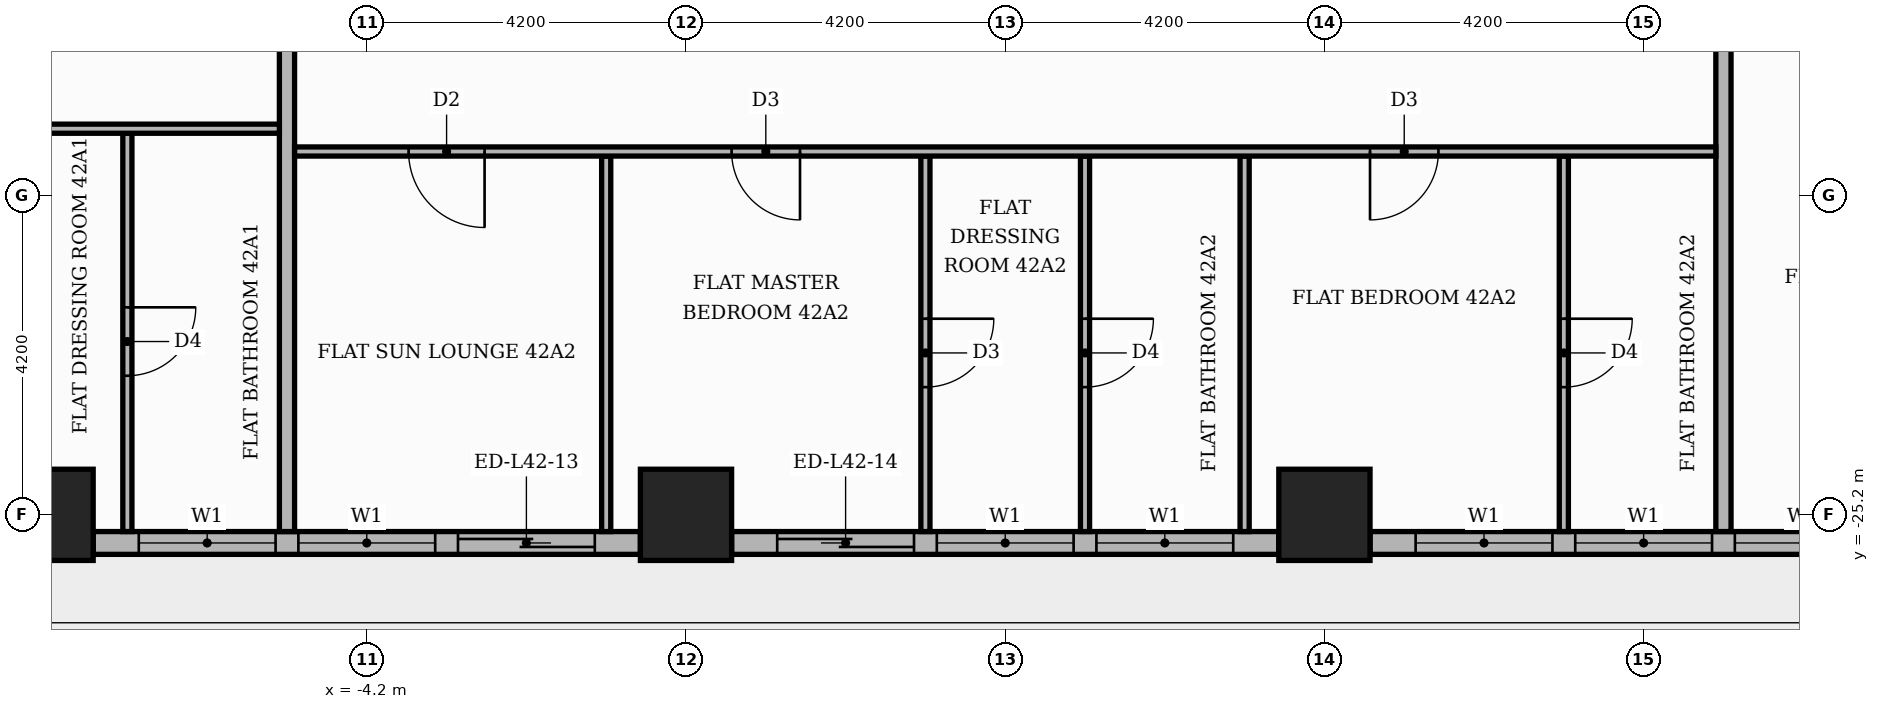
"""IFC4 building model, lengths in metres.
Left out: names, types, materials, properties, quantities, classifications, styles, units other than length and angle.
Written with IfcOpenShell. Run it as: python <this file> out.ifc"""

import sys

from ifc_helpers import new_model, si_unit, direction, frame, frame_2d, origin, origin_2d, place, context, subcontext, project, spatial, rectangle, extrude, element, fill, save


model = new_model("IFC4")
c1 = context("Model", 3, precision=1e-05, world=origin(), true_north=direction((0.0, 1.0)))
c2 = subcontext(c1, "Body", "Model", "MODEL_VIEW")
j1 = project(units=[si_unit("LENGTHUNIT", "METRE"), si_unit("PLANEANGLEUNIT", "RADIAN")], contexts=[c1])
p1 = place(None, origin())
s1 = spatial("IfcSite", under=j1, at=p1, CompositionType="ELEMENT")
p2 = place(p1, origin())
s2 = spatial("IfcBuilding", under=s1, at=p2, CompositionType="ELEMENT")
p3 = place(p2, frame((0.0, 0.0, 176.7)))
s3 = spatial("IfcBuildingStorey", under=s2, at=p3, CompositionType="ELEMENT", Elevation=176.7)
for number, where, z_axis, x_axis in (
    (1, (0.0, -25.2, 0.0), (0.0, 0.0, 1.0), (1.0, 0.0, 0.0)),
    (2, (8.4, -25.2, 0.0), (0.0, 0.0, 1.0), (1.0, 0.0, 0.0)),
    (3, (-8.4, -25.2, 0.0), (0.0, 0.0, 1.0), (1.0, 0.0, 0.0)),
):
    element("IfcColumn", number, at=place(p3, frame(where, z_axis=z_axis, x_axis=x_axis)), inside=s3, PredefinedType="COLUMN", context=c2, shape_type="SweptSolid", body=[
        extrude(rectangle(XDim=1.2, YDim=1.2, at=origin_2d()), origin(), (0.0, 0.0, 1.0), 3.9),
    ])
p4 = place(p3, frame((-7.8, -25.57, 0.0), z_axis=(0.0, 0.0, 1.0), x_axis=(1.0, 0.0, 0.0)))
e4 = element("IfcWall", 4, at=p4, inside=s3, PredefinedType="STANDARD", context=c2, shape_type="SweptSolid", body=[
    extrude(rectangle(XDim=7.2, YDim=0.3, at=frame_2d((3.6, 0.0))), origin(), (0.0, 0.0, 1.0), 3.4),
])
p5 = place(p4, frame((0.6, 0.0, 0.9)))
e5 = element("IfcOpeningElement", 5, at=p5, cuts=e4, PredefinedType="OPENING", context=c2, shape_type="SweptSolid", body=[
    extrude(rectangle(XDim=1.8, YDim=2.1, at=frame_2d((0.9, 1.05))), frame((0.0, 0.16, 0.0), z_axis=(0.0, -1.0, 0.0), x_axis=(1.0, 0.0, 0.0)), (0.0, 0.0, 1.0), 0.32),
])
p6 = place(p4, frame((2.7, 0.0, 0.9)))
e6 = element("IfcOpeningElement", 6, at=p6, cuts=e4, PredefinedType="OPENING", context=c2, shape_type="SweptSolid", body=[
    extrude(rectangle(XDim=1.8, YDim=2.1, at=frame_2d((0.9, 1.05))), frame((0.0, 0.16, 0.0), z_axis=(0.0, -1.0, 0.0), x_axis=(1.0, 0.0, 0.0)), (0.0, 0.0, 1.0), 0.32),
])
p7 = place(p4, frame((4.8, 0.0, 0.0)))
e7 = element("IfcOpeningElement", 7, at=p7, cuts=e4, PredefinedType="OPENING", context=c2, shape_type="SweptSolid", body=[
    extrude(rectangle(XDim=1.8, YDim=2.4, at=frame_2d((0.9, 1.2))), frame((0.0, 0.16, 0.0), z_axis=(0.0, -1.0, 0.0), x_axis=(1.0, 0.0, 0.0)), (0.0, 0.0, 1.0), 0.32),
])
p8 = place(p3, frame((0.6, -25.57, 0.0), z_axis=(0.0, 0.0, 1.0), x_axis=(1.0, 0.0, 0.0)))
e8 = element("IfcWall", 8, at=p8, inside=s3, PredefinedType="STANDARD", context=c2, shape_type="SweptSolid", body=[
    extrude(rectangle(XDim=7.2, YDim=0.3, at=frame_2d((3.6, 0.0))), origin(), (0.0, 0.0, 1.0), 3.4),
])
p9 = place(p8, frame((0.6, 0.0, 0.0)))
e9 = element("IfcOpeningElement", 9, at=p9, cuts=e8, PredefinedType="OPENING", context=c2, shape_type="SweptSolid", body=[
    extrude(rectangle(XDim=1.8, YDim=2.4, at=frame_2d((0.9, 1.2))), frame((0.0, 0.16, 0.0), z_axis=(0.0, -1.0, 0.0), x_axis=(1.0, 0.0, 0.0)), (0.0, 0.0, 1.0), 0.32),
])
p10 = place(p8, frame((2.7, 0.0, 0.9)))
e10 = element("IfcOpeningElement", 10, at=p10, cuts=e8, PredefinedType="OPENING", context=c2, shape_type="SweptSolid", body=[
    extrude(rectangle(XDim=1.8, YDim=2.1, at=frame_2d((0.9, 1.05))), frame((0.0, 0.16, 0.0), z_axis=(0.0, -1.0, 0.0), x_axis=(1.0, 0.0, 0.0)), (0.0, 0.0, 1.0), 0.32),
])
p11 = place(p8, frame((4.8, 0.0, 0.9)))
e11 = element("IfcOpeningElement", 11, at=p11, cuts=e8, PredefinedType="OPENING", context=c2, shape_type="SweptSolid", body=[
    extrude(rectangle(XDim=1.8, YDim=2.1, at=frame_2d((0.9, 1.05))), frame((0.0, 0.16, 0.0), z_axis=(0.0, -1.0, 0.0), x_axis=(1.0, 0.0, 0.0)), (0.0, 0.0, 1.0), 0.32),
])
p12 = place(p3, frame((9.0, -25.57, 0.0), z_axis=(0.0, 0.0, 1.0), x_axis=(1.0, 0.0, 0.0)))
e12 = element("IfcWall", 12, at=p12, inside=s3, PredefinedType="STANDARD", context=c2, shape_type="SweptSolid", body=[
    extrude(rectangle(XDim=7.2, YDim=0.3, at=frame_2d((3.6, 0.0))), origin(), (0.0, 0.0, 1.0), 3.4),
])
p13 = place(p12, frame((0.6, 0.0, 0.9)))
e13 = element("IfcOpeningElement", 13, at=p13, cuts=e12, PredefinedType="OPENING", context=c2, shape_type="SweptSolid", body=[
    extrude(rectangle(XDim=1.8, YDim=2.1, at=frame_2d((0.9, 1.05))), frame((0.0, 0.16, 0.0), z_axis=(0.0, -1.0, 0.0), x_axis=(1.0, 0.0, 0.0)), (0.0, 0.0, 1.0), 0.32),
])
p14 = place(p12, frame((2.7, 0.0, 0.9)))
e14 = element("IfcOpeningElement", 14, at=p14, cuts=e12, PredefinedType="OPENING", context=c2, shape_type="SweptSolid", body=[
    extrude(rectangle(XDim=1.8, YDim=2.1, at=frame_2d((0.9, 1.05))), frame((0.0, 0.16, 0.0), z_axis=(0.0, -1.0, 0.0), x_axis=(1.0, 0.0, 0.0)), (0.0, 0.0, 1.0), 0.32),
])
p15 = place(p12, frame((4.8, 0.0, 0.9)))
e15 = element("IfcOpeningElement", 15, at=p15, cuts=e12, PredefinedType="OPENING", context=c2, shape_type="SweptSolid", body=[
    extrude(rectangle(XDim=1.8, YDim=2.1, at=frame_2d((0.9, 1.05))), frame((0.0, 0.16, 0.0), z_axis=(0.0, -1.0, 0.0), x_axis=(1.0, 0.0, 0.0)), (0.0, 0.0, 1.0), 0.32),
])
p16 = place(p3, frame((-7.35, -25.42, 0.0), z_axis=(0.0, 0.0, 1.0), x_axis=(0.0, 1.0, 0.0)))
e16 = element("IfcWall", 16, at=p16, inside=s3, PredefinedType="PARTITIONING", context=c2, shape_type="SweptSolid", body=[
    extrude(rectangle(XDim=5.24, YDim=0.12, at=frame_2d((2.62, 0.0))), origin(), (0.0, 0.0, 1.0), 3.4),
])
p17 = place(p16, frame((2.05, 0.0, 0.0)))
e17 = element("IfcOpeningElement", 17, at=p17, cuts=e16, PredefinedType="OPENING", context=c2, shape_type="SweptSolid", body=[
    extrude(rectangle(XDim=0.9, YDim=2.1, at=frame_2d((0.45, 1.05))), frame((0.0, 0.07, 0.0), z_axis=(0.0, -1.0, 0.0), x_axis=(1.0, 0.0, 0.0)), (0.0, 0.0, 1.0), 0.14),
])
p18 = place(p3, frame((-5.25, -25.42, 0.0), z_axis=(0.0, 0.0, 1.0), x_axis=(0.0, 1.0, 0.0)))
e18 = element("IfcWall", 18, at=p18, inside=s3, PredefinedType="PARTITIONING", context=c2, shape_type="SweptSolid", body=[
    extrude(rectangle(XDim=11.67, YDim=0.2, at=frame_2d((5.835, 0.0))), origin(), (0.0, 0.0, 1.0), 3.4),
])
p19 = place(p3, frame((-1.05, -25.42, 0.0), z_axis=(0.0, 0.0, 1.0), x_axis=(0.0, 1.0, 0.0)))
e19 = element("IfcWall", 19, at=p19, inside=s3, PredefinedType="PARTITIONING", context=c2, shape_type="SweptSolid", body=[
    extrude(rectangle(XDim=4.94, YDim=0.12, at=frame_2d((2.47, 0.0))), origin(), (0.0, 0.0, 1.0), 3.4),
])
p20 = place(p3, frame((3.15, -25.42, 0.0), z_axis=(0.0, 0.0, 1.0), x_axis=(0.0, 1.0, 0.0)))
e20 = element("IfcWall", 20, at=p20, inside=s3, PredefinedType="PARTITIONING", context=c2, shape_type="SweptSolid", body=[
    extrude(rectangle(XDim=4.94, YDim=0.12, at=frame_2d((2.47, 0.0))), origin(), (0.0, 0.0, 1.0), 3.4),
])
p21 = place(p20, frame((1.9, 0.0, 0.0)))
e21 = element("IfcOpeningElement", 21, at=p21, cuts=e20, PredefinedType="OPENING", context=c2, shape_type="SweptSolid", body=[
    extrude(rectangle(XDim=0.9, YDim=2.1, at=frame_2d((0.45, 1.05))), frame((0.0, 0.07, 0.0), z_axis=(0.0, -1.0, 0.0), x_axis=(1.0, 0.0, 0.0)), (0.0, 0.0, 1.0), 0.14),
])
p22 = place(p3, frame((5.25, -25.42, 0.0), z_axis=(0.0, 0.0, 1.0), x_axis=(0.0, 1.0, 0.0)))
e22 = element("IfcWall", 22, at=p22, inside=s3, PredefinedType="PARTITIONING", context=c2, shape_type="SweptSolid", body=[
    extrude(rectangle(XDim=4.94, YDim=0.12, at=frame_2d((2.47, 0.0))), origin(), (0.0, 0.0, 1.0), 3.4),
])
p23 = place(p22, frame((1.9, 0.0, 0.0)))
e23 = element("IfcOpeningElement", 23, at=p23, cuts=e22, PredefinedType="OPENING", context=c2, shape_type="SweptSolid", body=[
    extrude(rectangle(XDim=0.9, YDim=2.1, at=frame_2d((0.45, 1.05))), frame((0.0, 0.07, 0.0), z_axis=(0.0, -1.0, 0.0), x_axis=(1.0, 0.0, 0.0)), (0.0, 0.0, 1.0), 0.14),
])
p24 = place(p3, frame((7.35, -25.42, 0.0), z_axis=(0.0, 0.0, 1.0), x_axis=(0.0, 1.0, 0.0)))
e24 = element("IfcWall", 24, at=p24, inside=s3, PredefinedType="PARTITIONING", context=c2, shape_type="SweptSolid", body=[
    extrude(rectangle(XDim=4.94, YDim=0.12, at=frame_2d((2.47, 0.0))), origin(), (0.0, 0.0, 1.0), 3.4),
])
p25 = place(p3, frame((11.55, -25.42, 0.0), z_axis=(0.0, 0.0, 1.0), x_axis=(0.0, 1.0, 0.0)))
e25 = element("IfcWall", 25, at=p25, inside=s3, PredefinedType="PARTITIONING", context=c2, shape_type="SweptSolid", body=[
    extrude(rectangle(XDim=4.94, YDim=0.12, at=frame_2d((2.47, 0.0))), origin(), (0.0, 0.0, 1.0), 3.4),
])
p26 = place(p25, frame((1.9, 0.0, 0.0)))
e26 = element("IfcOpeningElement", 26, at=p26, cuts=e25, PredefinedType="OPENING", context=c2, shape_type="SweptSolid", body=[
    extrude(rectangle(XDim=0.9, YDim=2.1, at=frame_2d((0.45, 1.05))), frame((0.0, 0.07, 0.0), z_axis=(0.0, -1.0, 0.0), x_axis=(1.0, 0.0, 0.0)), (0.0, 0.0, 1.0), 0.14),
])
p27 = place(p3, frame((13.65, -25.42, 0.0), z_axis=(0.0, 0.0, 1.0), x_axis=(0.0, 1.0, 0.0)))
e27 = element("IfcWall", 27, at=p27, inside=s3, PredefinedType="PARTITIONING", context=c2, shape_type="SweptSolid", body=[
    extrude(rectangle(XDim=11.67, YDim=0.2, at=frame_2d((5.835, 0.0))), origin(), (0.0, 0.0, 1.0), 3.4),
])
p28 = place(p3, frame((-5.15, -20.42, 0.0), z_axis=(0.0, 0.0, 1.0), x_axis=(1.0, 0.0, 0.0)))
e28 = element("IfcWall", 28, at=p28, inside=s3, PredefinedType="PARTITIONING", context=c2, shape_type="SweptSolid", body=[
    extrude(rectangle(XDim=18.7, YDim=0.12, at=frame_2d((9.35, 0.0))), origin(), (0.0, 0.0, 1.0), 3.4),
])
p29 = place(p28, frame((1.5, 0.0, 0.0)))
e29 = element("IfcOpeningElement", 29, at=p29, cuts=e28, PredefinedType="OPENING", context=c2, shape_type="SweptSolid", body=[
    extrude(rectangle(XDim=1.0, YDim=2.1, at=frame_2d((0.5, 1.05))), frame((0.0, 0.07, 0.0), z_axis=(0.0, -1.0, 0.0), x_axis=(1.0, 0.0, 0.0)), (0.0, 0.0, 1.0), 0.14),
])
p30 = place(p28, frame((5.75, 0.0, 0.0)))
e30 = element("IfcOpeningElement", 30, at=p30, cuts=e28, PredefinedType="OPENING", context=c2, shape_type="SweptSolid", body=[
    extrude(rectangle(XDim=0.9, YDim=2.1, at=frame_2d((0.45, 1.05))), frame((0.0, 0.07, 0.0), z_axis=(0.0, -1.0, 0.0), x_axis=(1.0, 0.0, 0.0)), (0.0, 0.0, 1.0), 0.14),
])
p31 = place(p28, frame((14.15, 0.0, 0.0)))
e31 = element("IfcOpeningElement", 31, at=p31, cuts=e28, PredefinedType="OPENING", context=c2, shape_type="SweptSolid", body=[
    extrude(rectangle(XDim=0.9, YDim=2.1, at=frame_2d((0.45, 1.05))), frame((0.0, 0.07, 0.0), z_axis=(0.0, -1.0, 0.0), x_axis=(1.0, 0.0, 0.0)), (0.0, 0.0, 1.0), 0.14),
])
p32 = place(p3, frame((-25.42, -20.12, 0.0), z_axis=(0.0, 0.0, 1.0), x_axis=(1.0, 0.0, 0.0)))
e32 = element("IfcWall", 32, at=p32, inside=s3, PredefinedType="PARTITIONING", context=c2, shape_type="SweptSolid", body=[
    extrude(rectangle(XDim=20.07, YDim=0.12, at=frame_2d((10.035, 0.0))), origin(), (0.0, 0.0, 1.0), 3.4),
])
p33 = place(p32, frame((10.22, 0.0, 0.0)))
e33 = element("IfcOpeningElement", 33, at=p33, cuts=e32, PredefinedType="OPENING", context=c2, shape_type="SweptSolid", body=[
    extrude(rectangle(XDim=1.0, YDim=2.1, at=frame_2d((0.5, 1.05))), frame((0.0, 0.07, 0.0), z_axis=(0.0, -1.0, 0.0), x_axis=(1.0, 0.0, 0.0)), (0.0, 0.0, 1.0), 0.14),
])
p34 = place(p32, frame((13.42, 0.0, 0.0)))
e34 = element("IfcOpeningElement", 34, at=p34, cuts=e32, PredefinedType="OPENING", context=c2, shape_type="SweptSolid", body=[
    extrude(rectangle(XDim=0.9, YDim=2.1, at=frame_2d((0.45, 1.05))), frame((0.0, 0.07, 0.0), z_axis=(0.0, -1.0, 0.0), x_axis=(1.0, 0.0, 0.0)), (0.0, 0.0, 1.0), 0.14),
])
p35 = place(p5, origin())
e35 = element("IfcWindow", 35, at=p35, inside=s3, PartitioningType="SINGLE_PANEL", PredefinedType="WINDOW", context=c2, shape_type="SweptSolid", body=[
    extrude(rectangle(XDim=1.8, YDim=2.1, at=frame_2d((0.9, 1.05))), frame((0.0, 0.03, 0.0), z_axis=(0.0, -1.0, 0.0), x_axis=(1.0, 0.0, 0.0)), (0.0, 0.0, 1.0), 0.06),
])
fill(e5, e35)
p36 = place(p6, origin())
e36 = element("IfcWindow", 36, at=p36, inside=s3, PartitioningType="SINGLE_PANEL", PredefinedType="WINDOW", context=c2, shape_type="SweptSolid", body=[
    extrude(rectangle(XDim=1.8, YDim=2.1, at=frame_2d((0.9, 1.05))), frame((0.0, 0.03, 0.0), z_axis=(0.0, -1.0, 0.0), x_axis=(1.0, 0.0, 0.0)), (0.0, 0.0, 1.0), 0.06),
])
fill(e6, e36)
p37 = place(p7, origin())
e37 = element("IfcDoor", 37, at=p37, inside=s3, OperationType="SLIDING_TO_RIGHT", PredefinedType="DOOR", context=c2, shape_type="SweptSolid", body=[
    extrude(rectangle(XDim=1.8, YDim=2.4, at=frame_2d((0.9, 1.2))), frame((0.0, 0.025, 0.0), z_axis=(0.0, -1.0, 0.0), x_axis=(1.0, 0.0, 0.0)), (0.0, 0.0, 1.0), 0.05),
])
fill(e7, e37)
p38 = place(p9, origin())
e38 = element("IfcDoor", 38, at=p38, inside=s3, OperationType="SLIDING_TO_LEFT", PredefinedType="DOOR", context=c2, shape_type="SweptSolid", body=[
    extrude(rectangle(XDim=1.8, YDim=2.4, at=frame_2d((0.9, 1.2))), frame((0.0, 0.025, 0.0), z_axis=(0.0, -1.0, 0.0), x_axis=(1.0, 0.0, 0.0)), (0.0, 0.0, 1.0), 0.05),
])
fill(e9, e38)
p39 = place(p10, origin())
e39 = element("IfcWindow", 39, at=p39, inside=s3, PartitioningType="SINGLE_PANEL", PredefinedType="WINDOW", context=c2, shape_type="SweptSolid", body=[
    extrude(rectangle(XDim=1.8, YDim=2.1, at=frame_2d((0.9, 1.05))), frame((0.0, 0.03, 0.0), z_axis=(0.0, -1.0, 0.0), x_axis=(1.0, 0.0, 0.0)), (0.0, 0.0, 1.0), 0.06),
])
fill(e10, e39)
p40 = place(p11, origin())
e40 = element("IfcWindow", 40, at=p40, inside=s3, PartitioningType="SINGLE_PANEL", PredefinedType="WINDOW", context=c2, shape_type="SweptSolid", body=[
    extrude(rectangle(XDim=1.8, YDim=2.1, at=frame_2d((0.9, 1.05))), frame((0.0, 0.03, 0.0), z_axis=(0.0, -1.0, 0.0), x_axis=(1.0, 0.0, 0.0)), (0.0, 0.0, 1.0), 0.06),
])
fill(e11, e40)
p41 = place(p13, origin())
e41 = element("IfcWindow", 41, at=p41, inside=s3, PartitioningType="SINGLE_PANEL", PredefinedType="WINDOW", context=c2, shape_type="SweptSolid", body=[
    extrude(rectangle(XDim=1.8, YDim=2.1, at=frame_2d((0.9, 1.05))), frame((0.0, 0.03, 0.0), z_axis=(0.0, -1.0, 0.0), x_axis=(1.0, 0.0, 0.0)), (0.0, 0.0, 1.0), 0.06),
])
fill(e13, e41)
p42 = place(p14, origin())
e42 = element("IfcWindow", 42, at=p42, inside=s3, PartitioningType="SINGLE_PANEL", PredefinedType="WINDOW", context=c2, shape_type="SweptSolid", body=[
    extrude(rectangle(XDim=1.8, YDim=2.1, at=frame_2d((0.9, 1.05))), frame((0.0, 0.03, 0.0), z_axis=(0.0, -1.0, 0.0), x_axis=(1.0, 0.0, 0.0)), (0.0, 0.0, 1.0), 0.06),
])
fill(e14, e42)
p43 = place(p15, origin())
e43 = element("IfcWindow", 43, at=p43, inside=s3, PartitioningType="SINGLE_PANEL", PredefinedType="WINDOW", context=c2, shape_type="SweptSolid", body=[
    extrude(rectangle(XDim=1.8, YDim=2.1, at=frame_2d((0.9, 1.05))), frame((0.0, 0.03, 0.0), z_axis=(0.0, -1.0, 0.0), x_axis=(1.0, 0.0, 0.0)), (0.0, 0.0, 1.0), 0.06),
])
fill(e15, e43)
p44 = place(p17, frame((0.9, 0.0, 0.0), z_axis=(0.0, 0.0, 1.0), x_axis=(-1.0, 0.0, 0.0)))
e44 = element("IfcDoor", 44, at=p44, inside=s3, OperationType="SINGLE_SWING_RIGHT", PredefinedType="DOOR", context=c2, shape_type="SweptSolid", body=[
    extrude(rectangle(XDim=0.9, YDim=2.1, at=frame_2d((0.45, 1.05))), frame((0.0, 0.025, 0.0), z_axis=(0.0, -1.0, 0.0), x_axis=(1.0, 0.0, 0.0)), (0.0, 0.0, 1.0), 0.05),
])
fill(e17, e44)
p45 = place(p29, frame((1.0, 0.0, 0.0), z_axis=(0.0, 0.0, 1.0), x_axis=(-1.0, 0.0, 0.0)))
e45 = element("IfcDoor", 45, at=p45, inside=s3, OperationType="SINGLE_SWING_RIGHT", PredefinedType="DOOR", context=c2, shape_type="SweptSolid", body=[
    extrude(rectangle(XDim=1.0, YDim=2.1, at=frame_2d((0.5, 1.05))), frame((0.0, 0.025, 0.0), z_axis=(0.0, -1.0, 0.0), x_axis=(1.0, 0.0, 0.0)), (0.0, 0.0, 1.0), 0.05),
])
fill(e29, e45)
p46 = place(p30, frame((0.9, 0.0, 0.0), z_axis=(0.0, 0.0, 1.0), x_axis=(-1.0, 0.0, 0.0)))
e46 = element("IfcDoor", 46, at=p46, inside=s3, OperationType="SINGLE_SWING_RIGHT", PredefinedType="DOOR", context=c2, shape_type="SweptSolid", body=[
    extrude(rectangle(XDim=0.9, YDim=2.1, at=frame_2d((0.45, 1.05))), frame((0.0, 0.025, 0.0), z_axis=(0.0, -1.0, 0.0), x_axis=(1.0, 0.0, 0.0)), (0.0, 0.0, 1.0), 0.05),
])
fill(e30, e46)
p47 = place(p21, frame((0.9, 0.0, 0.0), z_axis=(0.0, 0.0, 1.0), x_axis=(-1.0, 0.0, 0.0)))
e47 = element("IfcDoor", 47, at=p47, inside=s3, OperationType="SINGLE_SWING_RIGHT", PredefinedType="DOOR", context=c2, shape_type="SweptSolid", body=[
    extrude(rectangle(XDim=0.9, YDim=2.1, at=frame_2d((0.45, 1.05))), frame((0.0, 0.025, 0.0), z_axis=(0.0, -1.0, 0.0), x_axis=(1.0, 0.0, 0.0)), (0.0, 0.0, 1.0), 0.05),
])
fill(e21, e47)
p48 = place(p23, frame((0.9, 0.0, 0.0), z_axis=(0.0, 0.0, 1.0), x_axis=(-1.0, 0.0, 0.0)))
e48 = element("IfcDoor", 48, at=p48, inside=s3, OperationType="SINGLE_SWING_RIGHT", PredefinedType="DOOR", context=c2, shape_type="SweptSolid", body=[
    extrude(rectangle(XDim=0.9, YDim=2.1, at=frame_2d((0.45, 1.05))), frame((0.0, 0.025, 0.0), z_axis=(0.0, -1.0, 0.0), x_axis=(1.0, 0.0, 0.0)), (0.0, 0.0, 1.0), 0.05),
])
fill(e23, e48)
p49 = place(p31, frame((0.9, 0.0, 0.0), z_axis=(0.0, 0.0, 1.0), x_axis=(-1.0, 0.0, 0.0)))
e49 = element("IfcDoor", 49, at=p49, inside=s3, OperationType="SINGLE_SWING_LEFT", PredefinedType="DOOR", context=c2, shape_type="SweptSolid", body=[
    extrude(rectangle(XDim=0.9, YDim=2.1, at=frame_2d((0.45, 1.05))), frame((0.0, 0.025, 0.0), z_axis=(0.0, -1.0, 0.0), x_axis=(1.0, 0.0, 0.0)), (0.0, 0.0, 1.0), 0.05),
])
fill(e31, e49)
p50 = place(p26, frame((0.9, 0.0, 0.0), z_axis=(0.0, 0.0, 1.0), x_axis=(-1.0, 0.0, 0.0)))
e50 = element("IfcDoor", 50, at=p50, inside=s3, OperationType="SINGLE_SWING_RIGHT", PredefinedType="DOOR", context=c2, shape_type="SweptSolid", body=[
    extrude(rectangle(XDim=0.9, YDim=2.1, at=frame_2d((0.45, 1.05))), frame((0.0, 0.025, 0.0), z_axis=(0.0, -1.0, 0.0), x_axis=(1.0, 0.0, 0.0)), (0.0, 0.0, 1.0), 0.05),
])
fill(e26, e50)
save(model, sys.argv[1])
